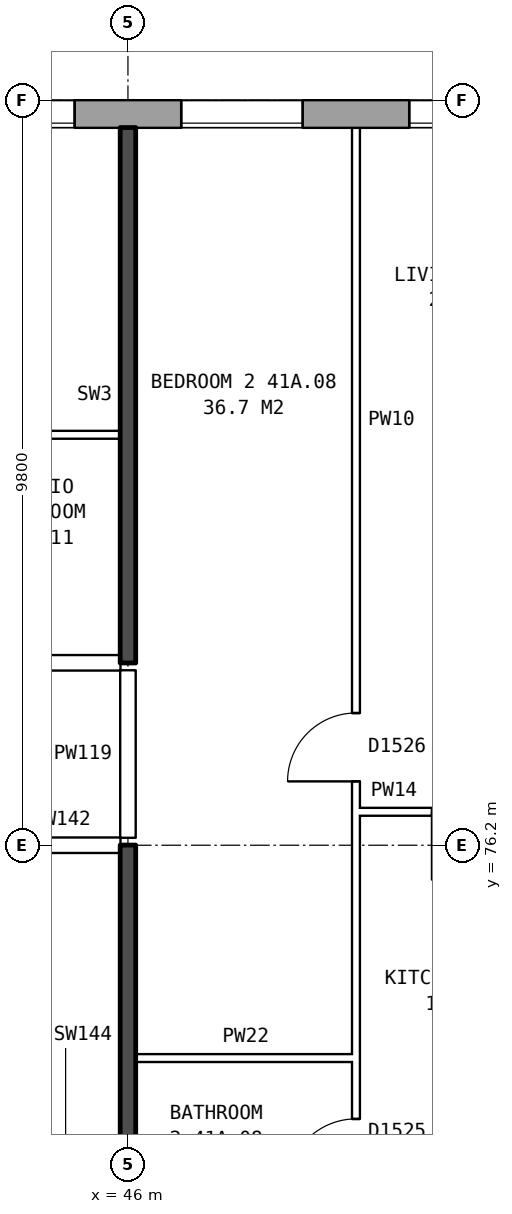
"""IFC4 building model, lengths in metres.
Left out: names, types, materials, properties, quantities, classifications, styles, units other than length and angle.
Written with IfcOpenShell. Run it as: python <this file> out.ifc"""

import sys

from ifc_helpers import new_model, si_unit, direction, frame, frame_2d, origin, place, context, subcontext, project, spatial, rectangle, extrude, element, fill, save


model = new_model("IFC4")
c1 = context("Model", 3, precision=1e-05, world=origin(), true_north=direction((0.0, 1.0)))
c2 = subcontext(c1, "Body", "Model", "MODEL_VIEW")
j1 = project(units=[si_unit("LENGTHUNIT", "METRE"), si_unit("PLANEANGLEUNIT", "RADIAN")], contexts=[c1])
p1 = place(None, origin())
s1 = spatial("IfcSite", under=j1, at=p1, CompositionType="ELEMENT")
p2 = place(p1, origin())
s2 = spatial("IfcBuilding", under=s1, at=p2, CompositionType="ELEMENT")
p3 = place(p2, frame((0.0, 0.0, 148.5)))
s3 = spatial("IfcBuildingStorey", under=s2, at=p3, CompositionType="ELEMENT", Elevation=148.5)
p4 = place(p3, frame((72.925, 85.82, 0.0), z_axis=(0.0, 0.0, 1.0), x_axis=(-1.0, 0.0, 0.0)))
e1 = element("IfcWall", 1, at=p4, inside=s3, PredefinedType="STANDARD", context=c2, shape_type="SweptSolid", body=[
    extrude(rectangle(XDim=41.351, YDim=0.36, at=frame_2d((20.675, 0.0))), origin(), (0.0, 0.0, 1.0), 2.85),
])
p5 = place(p4, frame((0.3, 0.0, 0.8)))
e2 = element("IfcOpeningElement", 2, at=p5, cuts=e1, PredefinedType="OPENING", context=c2, shape_type="SweptSolid", body=[
    extrude(rectangle(XDim=0.8, YDim=0.9, at=frame_2d((0.4, 0.45))), frame((0.0, 0.19, 0.0), z_axis=(0.0, -1.0, 0.0), x_axis=(1.0, 0.0, 0.0)), (0.0, 0.0, 1.0), 0.38),
])
p6 = place(p4, frame((3.625, 0.0, 0.8)))
e3 = element("IfcOpeningElement", 3, at=p6, cuts=e1, PredefinedType="OPENING", context=c2, shape_type="SweptSolid", body=[
    extrude(rectangle(XDim=1.6, YDim=1.8, at=frame_2d((0.8, 0.9))), frame((0.0, 0.19, 0.0), z_axis=(0.0, -1.0, 0.0), x_axis=(1.0, 0.0, 0.0)), (0.0, 0.0, 1.0), 0.38),
])
p7 = place(p4, frame((6.625, 0.0, 0.8)))
e4 = element("IfcOpeningElement", 4, at=p7, cuts=e1, PredefinedType="OPENING", context=c2, shape_type="SweptSolid", body=[
    extrude(rectangle(XDim=1.6, YDim=1.8, at=frame_2d((0.8, 0.9))), frame((0.0, 0.19, 0.0), z_axis=(0.0, -1.0, 0.0), x_axis=(1.0, 0.0, 0.0)), (0.0, 0.0, 1.0), 0.38),
])
p8 = place(p4, frame((9.625, 0.0, 0.8)))
e5 = element("IfcOpeningElement", 5, at=p8, cuts=e1, PredefinedType="OPENING", context=c2, shape_type="SweptSolid", body=[
    extrude(rectangle(XDim=1.6, YDim=1.8, at=frame_2d((0.8, 0.9))), frame((0.0, 0.19, 0.0), z_axis=(0.0, -1.0, 0.0), x_axis=(1.0, 0.0, 0.0)), (0.0, 0.0, 1.0), 0.38),
])
p9 = place(p4, frame((12.625, 0.0, 0.8)))
e6 = element("IfcOpeningElement", 6, at=p9, cuts=e1, PredefinedType="OPENING", context=c2, shape_type="SweptSolid", body=[
    extrude(rectangle(XDim=1.6, YDim=1.8, at=frame_2d((0.8, 0.9))), frame((0.0, 0.19, 0.0), z_axis=(0.0, -1.0, 0.0), x_axis=(1.0, 0.0, 0.0)), (0.0, 0.0, 1.0), 0.38),
])
p10 = place(p4, frame((15.625, 0.0, 0.8)))
e7 = element("IfcOpeningElement", 7, at=p10, cuts=e1, PredefinedType="OPENING", context=c2, shape_type="SweptSolid", body=[
    extrude(rectangle(XDim=1.6, YDim=1.8, at=frame_2d((0.8, 0.9))), frame((0.0, 0.19, 0.0), z_axis=(0.0, -1.0, 0.0), x_axis=(1.0, 0.0, 0.0)), (0.0, 0.0, 1.0), 0.38),
])
p11 = place(p4, frame((18.625, 0.0, 0.8)))
e8 = element("IfcOpeningElement", 8, at=p11, cuts=e1, PredefinedType="OPENING", context=c2, shape_type="SweptSolid", body=[
    extrude(rectangle(XDim=1.6, YDim=1.8, at=frame_2d((0.8, 0.9))), frame((0.0, 0.19, 0.0), z_axis=(0.0, -1.0, 0.0), x_axis=(1.0, 0.0, 0.0)), (0.0, 0.0, 1.0), 0.38),
])
p12 = place(p4, frame((21.625, 0.0, 0.8)))
e9 = element("IfcOpeningElement", 9, at=p12, cuts=e1, PredefinedType="OPENING", context=c2, shape_type="SweptSolid", body=[
    extrude(rectangle(XDim=1.6, YDim=1.8, at=frame_2d((0.8, 0.9))), frame((0.0, 0.19, 0.0), z_axis=(0.0, -1.0, 0.0), x_axis=(1.0, 0.0, 0.0)), (0.0, 0.0, 1.0), 0.38),
])
p13 = place(p4, frame((24.625, 0.0, 0.8)))
e10 = element("IfcOpeningElement", 10, at=p13, cuts=e1, PredefinedType="OPENING", context=c2, shape_type="SweptSolid", body=[
    extrude(rectangle(XDim=1.6, YDim=1.8, at=frame_2d((0.8, 0.9))), frame((0.0, 0.19, 0.0), z_axis=(0.0, -1.0, 0.0), x_axis=(1.0, 0.0, 0.0)), (0.0, 0.0, 1.0), 0.38),
])
p14 = place(p4, frame((27.625, 0.0, 0.8)))
e11 = element("IfcOpeningElement", 11, at=p14, cuts=e1, PredefinedType="OPENING", context=c2, shape_type="SweptSolid", body=[
    extrude(rectangle(XDim=1.6, YDim=1.8, at=frame_2d((0.8, 0.9))), frame((0.0, 0.19, 0.0), z_axis=(0.0, -1.0, 0.0), x_axis=(1.0, 0.0, 0.0)), (0.0, 0.0, 1.0), 0.38),
])
p15 = place(p4, frame((30.625, 0.0, 0.8)))
e12 = element("IfcOpeningElement", 12, at=p15, cuts=e1, PredefinedType="OPENING", context=c2, shape_type="SweptSolid", body=[
    extrude(rectangle(XDim=1.6, YDim=1.8, at=frame_2d((0.8, 0.9))), frame((0.0, 0.19, 0.0), z_axis=(0.0, -1.0, 0.0), x_axis=(1.0, 0.0, 0.0)), (0.0, 0.0, 1.0), 0.38),
])
p16 = place(p4, frame((33.625, 0.0, 0.8)))
e13 = element("IfcOpeningElement", 13, at=p16, cuts=e1, PredefinedType="OPENING", context=c2, shape_type="SweptSolid", body=[
    extrude(rectangle(XDim=1.6, YDim=1.8, at=frame_2d((0.8, 0.9))), frame((0.0, 0.19, 0.0), z_axis=(0.0, -1.0, 0.0), x_axis=(1.0, 0.0, 0.0)), (0.0, 0.0, 1.0), 0.38),
])
p17 = place(p4, frame((36.625, 0.0, 0.8)))
e14 = element("IfcOpeningElement", 14, at=p17, cuts=e1, PredefinedType="OPENING", context=c2, shape_type="SweptSolid", body=[
    extrude(rectangle(XDim=1.6, YDim=1.8, at=frame_2d((0.8, 0.9))), frame((0.0, 0.19, 0.0), z_axis=(0.0, -1.0, 0.0), x_axis=(1.0, 0.0, 0.0)), (0.0, 0.0, 1.0), 0.38),
])
p18 = place(p4, frame((1.4, 0.0, 0.8)))
e15 = element("IfcOpeningElement", 15, at=p18, cuts=e1, PredefinedType="OPENING", context=c2, shape_type="SweptSolid", body=[
    extrude(rectangle(XDim=1.2, YDim=1.8, at=frame_2d((0.6, 0.9))), frame((0.0, 0.19, 0.0), z_axis=(0.0, -1.0, 0.0), x_axis=(1.0, 0.0, 0.0)), (0.0, 0.0, 1.0), 0.38),
])
p19 = place(p3, frame((46.1, 73.4, 0.0), z_axis=(0.0, 0.0, 1.0), x_axis=(1.0, 0.0, 0.0)))
e16 = element("IfcWall", 16, at=p19, inside=s3, PredefinedType="PARTITIONING", context=c2, shape_type="SweptSolid", body=[
    extrude(rectangle(XDim=2.9, YDim=0.1, at=frame_2d((1.45, 0.0))), origin(), (0.0, 0.0, 1.0), 2.85),
])
p20 = place(p3, frame((44.36, 76.2, 0.0), z_axis=(0.0, 0.0, 1.0), x_axis=(1.0, 0.0, 0.0)))
e17 = element("IfcWall", 17, at=p20, inside=s3, PredefinedType="PARTITIONING", context=c2, shape_type="SweptSolid", body=[
    extrude(rectangle(XDim=1.54, YDim=0.2, at=frame_2d((0.77, 0.0))), origin(), (0.0, 0.0, 1.0), 2.85),
])
p21 = place(p3, frame((49.0, 76.64, 0.0), z_axis=(0.0, 0.0, 1.0), x_axis=(1.0, 0.0, 0.0)))
e18 = element("IfcWall", 18, at=p21, inside=s3, PredefinedType="PARTITIONING", context=c2, shape_type="SweptSolid", body=[
    extrude(rectangle(XDim=2.9, YDim=0.1, at=frame_2d((1.45, 0.0))), origin(), (0.0, 0.0, 1.0), 2.85),
])
p22 = place(p21, frame((1.0, 0.0, 0.0)))
e19 = element("IfcOpeningElement", 19, at=p22, cuts=e18, PredefinedType="OPENING", context=c2, shape_type="SweptSolid", body=[
    extrude(rectangle(XDim=0.9, YDim=2.1, at=frame_2d((0.45, 1.05))), frame((0.0, 0.06, 0.0), z_axis=(0.0, -1.0, 0.0), x_axis=(1.0, 0.0, 0.0)), (0.0, 0.0, 1.0), 0.12),
])
p23 = place(p3, frame((28.86, 78.6, 0.0), z_axis=(0.0, 0.0, 1.0), x_axis=(1.0, 0.0, 0.0)))
e20 = element("IfcWall", 20, at=p23, inside=s3, PredefinedType="PARTITIONING", context=c2, shape_type="SweptSolid", body=[
    extrude(rectangle(XDim=17.04, YDim=0.2, at=frame_2d((8.52, 0.0))), origin(), (0.0, 0.0, 1.0), 2.85),
])
p24 = place(p23, frame((12.44, 0.0, 0.0)))
e21 = element("IfcOpeningElement", 21, at=p24, cuts=e20, PredefinedType="OPENING", context=c2, shape_type="SweptSolid", body=[
    extrude(rectangle(XDim=1.0, YDim=2.1, at=frame_2d((0.5, 1.05))), frame((0.0, 0.11, 0.0), z_axis=(0.0, -1.0, 0.0), x_axis=(1.0, 0.0, 0.0)), (0.0, 0.0, 1.0), 0.22),
])
p25 = place(p23, frame((7.64, 0.0, 0.0)))
e22 = element("IfcOpeningElement", 22, at=p25, cuts=e20, PredefinedType="OPENING", context=c2, shape_type="SweptSolid", body=[
    extrude(rectangle(XDim=1.0, YDim=2.1, at=frame_2d((0.5, 1.05))), frame((0.0, 0.11, 0.0), z_axis=(0.0, -1.0, 0.0), x_axis=(1.0, 0.0, 0.0)), (0.0, 0.0, 1.0), 0.22),
])
p26 = place(p3, frame((43.6, 81.6, 0.0), z_axis=(0.0, 0.0, 1.0), x_axis=(1.0, 0.0, 0.0)))
e23 = element("IfcWall", 23, at=p26, inside=s3, PredefinedType="PARTITIONING", context=c2, shape_type="SweptSolid", body=[
    extrude(rectangle(XDim=2.3, YDim=0.1, at=frame_2d((1.15, 0.0))), origin(), (0.0, 0.0, 1.0), 2.85),
])
p27 = place(p3, frame((46.0, 71.2, 0.0), z_axis=(0.0, 0.0, 1.0), x_axis=(0.0, 1.0, 0.0)))
e24 = element("IfcWall", 24, at=p27, inside=s3, PredefinedType="SOLIDWALL", context=c2, shape_type="SweptSolid", body=[
    extrude(rectangle(XDim=5.0, YDim=0.2, at=frame_2d((2.5, 0.0))), origin(), (0.0, 0.0, 1.0), 2.85),
])
p28 = place(p3, frame((46.0, 76.3, 0.0), z_axis=(0.0, 0.0, 1.0), x_axis=(0.0, 1.0, 0.0)))
e25 = element("IfcWall", 25, at=p28, inside=s3, PredefinedType="PARTITIONING", context=c2, shape_type="SweptSolid", body=[
    extrude(rectangle(XDim=2.2, YDim=0.2, at=frame_2d((1.1, 0.0))), origin(), (0.0, 0.0, 1.0), 2.85),
])
p29 = place(p3, frame((46.0, 78.6, 0.0), z_axis=(0.0, 0.0, 1.0), x_axis=(0.0, 1.0, 0.0)))
e26 = element("IfcWall", 26, at=p29, inside=s3, PredefinedType="SOLIDWALL", context=c2, shape_type="SweptSolid", body=[
    extrude(rectangle(XDim=7.04, YDim=0.2, at=frame_2d((3.52, 0.0))), origin(), (0.0, 0.0, 1.0), 2.85),
])
p30 = place(p3, frame((49.0, 71.3, 0.0), z_axis=(0.0, 0.0, 1.0), x_axis=(0.0, 1.0, 0.0)))
e27 = element("IfcWall", 27, at=p30, inside=s3, PredefinedType="PARTITIONING", context=c2, shape_type="SweptSolid", body=[
    extrude(rectangle(XDim=14.34, YDim=0.1, at=frame_2d((7.17, 0.0))), origin(), (0.0, 0.0, 1.0), 2.85),
])
p31 = place(p30, frame((5.74, 0.0, 0.0)))
e28 = element("IfcOpeningElement", 28, at=p31, cuts=e27, PredefinedType="OPENING", context=c2, shape_type="SweptSolid", body=[
    extrude(rectangle(XDim=0.9, YDim=2.1, at=frame_2d((0.45, 1.05))), frame((0.0, 0.06, 0.0), z_axis=(0.0, -1.0, 0.0), x_axis=(1.0, 0.0, 0.0)), (0.0, 0.0, 1.0), 0.12),
])
p32 = place(p30, frame((0.4, 0.0, 0.0)))
e29 = element("IfcOpeningElement", 29, at=p32, cuts=e27, PredefinedType="OPENING", context=c2, shape_type="SweptSolid", body=[
    extrude(rectangle(XDim=0.9, YDim=2.1, at=frame_2d((0.45, 1.05))), frame((0.0, 0.06, 0.0), z_axis=(0.0, -1.0, 0.0), x_axis=(1.0, 0.0, 0.0)), (0.0, 0.0, 1.0), 0.12),
])
p33 = place(p12, origin())
e30 = element("IfcWindow", 30, at=p33, inside=s3, PartitioningType="SINGLE_PANEL", PredefinedType="WINDOW", context=c2, shape_type="SweptSolid", body=[
    extrude(rectangle(XDim=1.6, YDim=1.8, at=frame_2d((0.8, 0.9))), frame((0.0, 0.15, 0.0), z_axis=(0.0, -1.0, 0.0), x_axis=(1.0, 0.0, 0.0)), (0.0, 0.0, 1.0), 0.06),
])
fill(e9, e30)
p34 = place(p13, origin())
e31 = element("IfcWindow", 31, at=p34, inside=s3, PartitioningType="SINGLE_PANEL", PredefinedType="WINDOW", context=c2, shape_type="SweptSolid", body=[
    extrude(rectangle(XDim=1.6, YDim=1.8, at=frame_2d((0.8, 0.9))), frame((0.0, 0.15, 0.0), z_axis=(0.0, -1.0, 0.0), x_axis=(1.0, 0.0, 0.0)), (0.0, 0.0, 1.0), 0.06),
])
fill(e10, e31)
p35 = place(p14, origin())
e32 = element("IfcWindow", 32, at=p35, inside=s3, PartitioningType="SINGLE_PANEL", PredefinedType="WINDOW", context=c2, shape_type="SweptSolid", body=[
    extrude(rectangle(XDim=1.6, YDim=1.8, at=frame_2d((0.8, 0.9))), frame((0.0, 0.15, 0.0), z_axis=(0.0, -1.0, 0.0), x_axis=(1.0, 0.0, 0.0)), (0.0, 0.0, 1.0), 0.06),
])
fill(e11, e32)
p36 = place(p31, origin())
e33 = element("IfcDoor", 33, at=p36, inside=s3, OperationType="SINGLE_SWING_LEFT", PredefinedType="DOOR", context=c2, shape_type="SweptSolid", body=[
    extrude(rectangle(XDim=0.9, YDim=2.1, at=frame_2d((0.45, 1.05))), frame((0.0, 0.025, 0.0), z_axis=(0.0, -1.0, 0.0), x_axis=(1.0, 0.0, 0.0)), (0.0, 0.0, 1.0), 0.05),
])
fill(e28, e33)
p37 = place(p32, origin())
e34 = element("IfcDoor", 34, at=p37, inside=s3, OperationType="SINGLE_SWING_LEFT", PredefinedType="DOOR", context=c2, shape_type="SweptSolid", body=[
    extrude(rectangle(XDim=0.9, YDim=2.1, at=frame_2d((0.45, 1.05))), frame((0.0, 0.025, 0.0), z_axis=(0.0, -1.0, 0.0), x_axis=(1.0, 0.0, 0.0)), (0.0, 0.0, 1.0), 0.05),
])
fill(e29, e34)
save(model, sys.argv[1])
